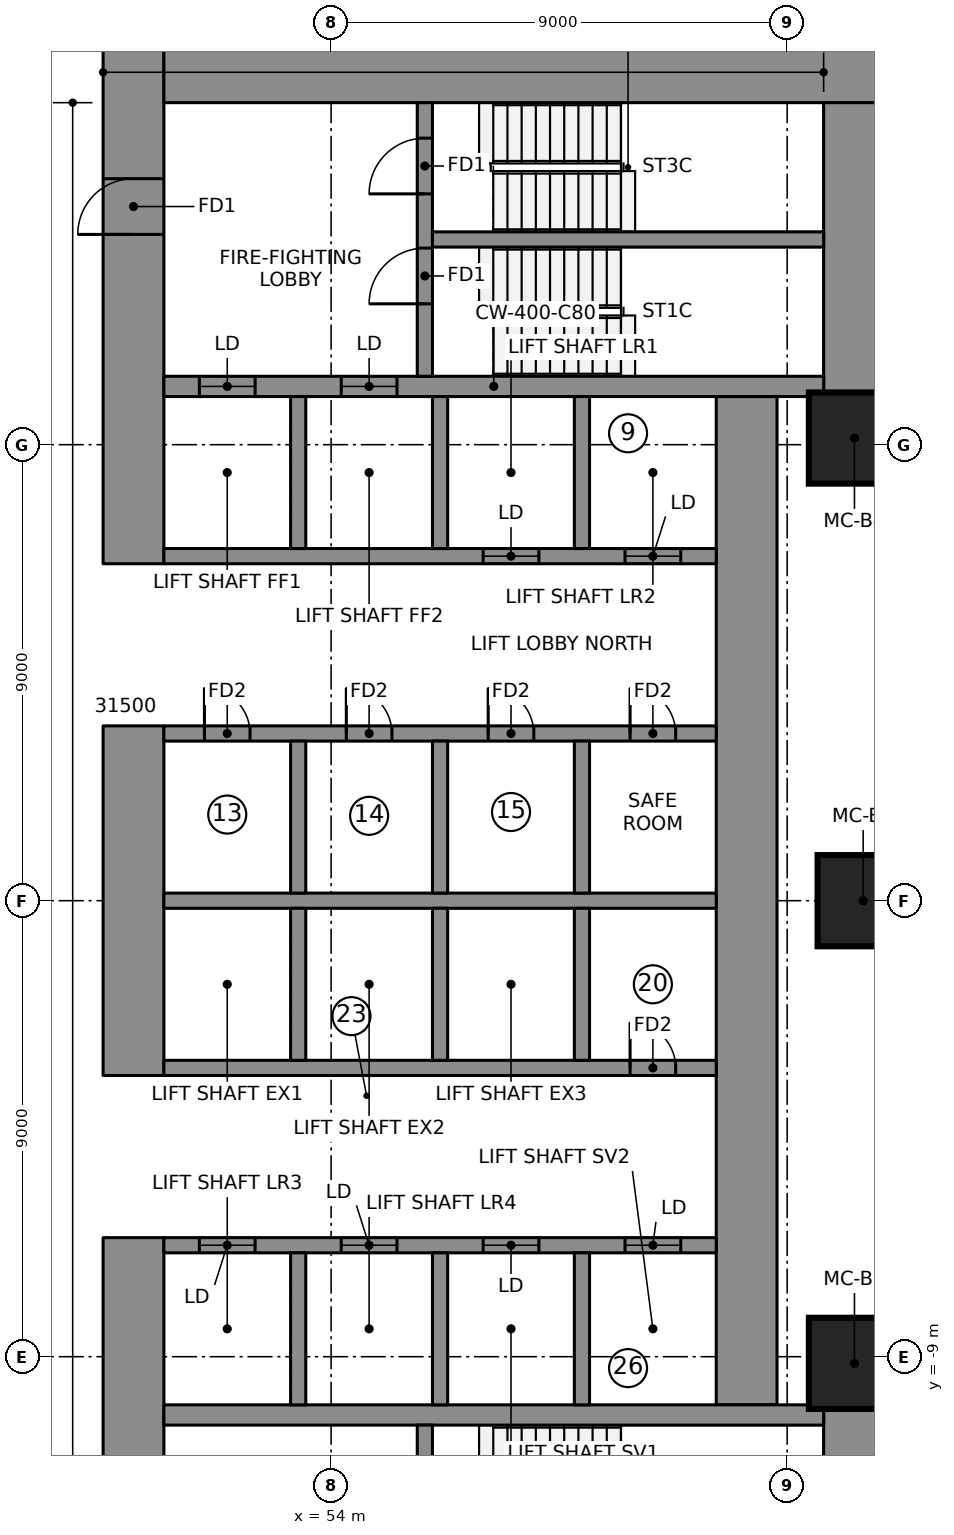
"""IFC4 building model, lengths in metres.
Left out: names, types, materials, properties, quantities, classifications, styles, units other than length and angle.
Written with IfcOpenShell. Run it as: python <this file> out.ifc"""

import sys

from ifc_helpers import new_model, si_unit, direction, frame, frame_2d, origin, origin_2d, place, context, subcontext, project, spatial, rectangle, extrude, element, fill, save


model = new_model("IFC4")
c1 = context("Model", 3, precision=1e-05, world=origin(), true_north=direction((0.0, 1.0)))
c2 = subcontext(c1, "Body", "Model", "MODEL_VIEW")
j1 = project(units=[si_unit("LENGTHUNIT", "METRE"), si_unit("PLANEANGLEUNIT", "RADIAN")], contexts=[c1])
p1 = place(None, origin())
s1 = spatial("IfcSite", under=j1, at=p1, CompositionType="ELEMENT")
p2 = place(p1, origin())
s2 = spatial("IfcBuilding", under=s1, at=p2, CompositionType="ELEMENT")
p3 = place(p2, frame((0.0, 0.0, 50.25)))
s3 = spatial("IfcBuildingStorey", under=s2, at=p3, CompositionType="ELEMENT", Elevation=50.25)
p4 = place(p3, frame((50.1, 6.65, 0.0), z_axis=(0.0, 0.0, 1.0), x_axis=(0.0, 1.0, 0.0)))
e1 = element("IfcWall", 1, at=p4, inside=s3, PredefinedType="SHEAR", context=c2, shape_type="SweptSolid", body=[
    extrude(rectangle(XDim=10.3, YDim=1.2, at=frame_2d((5.15, 0.0))), origin(), (0.0, 0.0, 1.0), 3.55),
])
p5 = place(p4, frame((6.5, 0.0, 0.0)))
e2 = element("IfcOpeningElement", 2, at=p5, cuts=e1, PredefinedType="OPENING", context=c2, shape_type="SweptSolid", body=[
    extrude(rectangle(XDim=1.1, YDim=2.1, at=frame_2d((0.55, 1.05))), frame((0.0, 0.61, 0.0), z_axis=(0.0, -1.0, 0.0), x_axis=(1.0, 0.0, 0.0)), (0.0, 0.0, 1.0), 1.22),
])
p6 = place(p3, frame((50.1, -3.45, 0.0), z_axis=(0.0, 0.0, 1.0), x_axis=(0.0, 1.0, 0.0)))
e3 = element("IfcWall", 3, at=p6, inside=s3, PredefinedType="SHEAR", context=c2, shape_type="SweptSolid", body=[
    extrude(rectangle(XDim=6.9, YDim=1.2, at=frame_2d((3.45, 0.0))), origin(), (0.0, 0.0, 1.0), 3.55),
])
p7 = place(p3, frame((50.1, -16.95, 0.0), z_axis=(0.0, 0.0, 1.0), x_axis=(0.0, 1.0, 0.0)))
e4 = element("IfcWall", 4, at=p7, inside=s3, PredefinedType="SHEAR", context=c2, shape_type="SweptSolid", body=[
    extrude(rectangle(XDim=10.3, YDim=1.2, at=frame_2d((5.15, 0.0))), origin(), (0.0, 0.0, 1.0), 3.55),
])
p8 = place(p7, frame((2.7, 0.0, 0.0)))
e5 = element("IfcOpeningElement", 5, at=p8, cuts=e4, PredefinedType="OPENING", context=c2, shape_type="SweptSolid", body=[
    extrude(rectangle(XDim=1.1, YDim=2.1, at=frame_2d((0.55, 1.05))), frame((0.0, 0.61, 0.0), z_axis=(0.0, -1.0, 0.0), x_axis=(1.0, 0.0, 0.0)), (0.0, 0.0, 1.0), 1.22),
])
p9 = place(p3, frame((50.7, 16.35, 0.0), z_axis=(0.0, 0.0, 1.0), x_axis=(1.0, 0.0, 0.0)))
e6 = element("IfcWall", 6, at=p9, inside=s3, PredefinedType="SHEAR", context=c2, shape_type="SweptSolid", body=[
    extrude(rectangle(XDim=14.22, YDim=1.2, at=frame_2d((7.11, 0.0))), origin(), (0.0, 0.0, 1.0), 3.55),
])
for number, where, z_axis, x_axis in (
    (7, (64.32, 9.95, 0.0), (0.0, 0.0, 1.0), (0.0, 1.0, 0.0)),
    (8, (64.32, -15.75, 0.0), (0.0, 0.0, 1.0), (0.0, 1.0, 0.0)),
):
    element("IfcWall", number, at=place(p3, frame(where, z_axis=z_axis, x_axis=x_axis)), inside=s3, PredefinedType="SHEAR", context=c2, shape_type="SweptSolid", body=[
        extrude(rectangle(XDim=5.8, YDim=1.2, at=frame_2d((2.9, 0.0))), origin(), (0.0, 0.0, 1.0), 3.55),
    ])
p10 = place(p3, frame((62.2, -9.95, 0.0), z_axis=(0.0, 0.0, 1.0), x_axis=(0.0, 1.0, 0.0)))
e9 = element("IfcWall", 9, at=p10, inside=s3, PredefinedType="SHEAR", context=c2, shape_type="SweptSolid", body=[
    extrude(rectangle(XDim=19.9, YDim=1.2, at=frame_2d((9.95, 0.0))), origin(), (0.0, 0.0, 1.0), 3.55),
])
p11 = place(p3, frame((50.7, 10.15, 0.0), z_axis=(0.0, 0.0, 1.0), x_axis=(1.0, 0.0, 0.0)))
e10 = element("IfcWall", 10, at=p11, inside=s3, PredefinedType="SHEAR", context=c2, shape_type="SweptSolid", body=[
    extrude(rectangle(XDim=13.02, YDim=0.4, at=frame_2d((6.51, 0.0))), origin(), (0.0, 0.0, 1.0), 3.55),
])
p12 = place(p11, frame((0.7, 0.0, 0.0)))
e11 = element("IfcOpeningElement", 11, at=p12, cuts=e10, PredefinedType="OPENING", context=c2, shape_type="SweptSolid", body=[
    extrude(rectangle(XDim=1.1, YDim=2.1, at=frame_2d((0.55, 1.05))), frame((0.0, 0.21, 0.0), z_axis=(0.0, -1.0, 0.0), x_axis=(1.0, 0.0, 0.0)), (0.0, 0.0, 1.0), 0.42),
])
p13 = place(p11, frame((3.5, 0.0, 0.0)))
e12 = element("IfcOpeningElement", 12, at=p13, cuts=e10, PredefinedType="OPENING", context=c2, shape_type="SweptSolid", body=[
    extrude(rectangle(XDim=1.1, YDim=2.1, at=frame_2d((0.55, 1.05))), frame((0.0, 0.21, 0.0), z_axis=(0.0, -1.0, 0.0), x_axis=(1.0, 0.0, 0.0)), (0.0, 0.0, 1.0), 0.42),
])
p14 = place(p3, frame((50.7, -10.15, 0.0), z_axis=(0.0, 0.0, 1.0), x_axis=(1.0, 0.0, 0.0)))
e13 = element("IfcWall", 13, at=p14, inside=s3, PredefinedType="SHEAR", context=c2, shape_type="SweptSolid", body=[
    extrude(rectangle(XDim=13.02, YDim=0.4, at=frame_2d((6.51, 0.0))), origin(), (0.0, 0.0, 1.0), 3.55),
])
p15 = place(p3, frame((50.7, 0.0, 0.0), z_axis=(0.0, 0.0, 1.0), x_axis=(1.0, 0.0, 0.0)))
e14 = element("IfcWall", 14, at=p15, inside=s3, PredefinedType="SHEAR", context=c2, shape_type="SweptSolid", body=[
    extrude(rectangle(XDim=10.9, YDim=0.3, at=frame_2d((5.45, 0.0))), origin(), (0.0, 0.0, 1.0), 3.55),
])
p16 = place(p3, frame((50.7, 3.3, 0.0), z_axis=(0.0, 0.0, 1.0), x_axis=(1.0, 0.0, 0.0)))
e15 = element("IfcWall", 15, at=p16, inside=s3, PredefinedType="SHEAR", context=c2, shape_type="SweptSolid", body=[
    extrude(rectangle(XDim=10.9, YDim=0.3, at=frame_2d((5.45, 0.0))), origin(), (0.0, 0.0, 1.0), 3.55),
])
p17 = place(p16, frame((0.8, 0.0, 0.0)))
e16 = element("IfcOpeningElement", 16, at=p17, cuts=e15, PredefinedType="OPENING", context=c2, shape_type="SweptSolid", body=[
    extrude(rectangle(XDim=0.9, YDim=2.1, at=frame_2d((0.45, 1.05))), frame((0.0, 0.16, 0.0), z_axis=(0.0, -1.0, 0.0), x_axis=(1.0, 0.0, 0.0)), (0.0, 0.0, 1.0), 0.32),
])
p18 = place(p16, frame((3.6, 0.0, 0.0)))
e17 = element("IfcOpeningElement", 17, at=p18, cuts=e15, PredefinedType="OPENING", context=c2, shape_type="SweptSolid", body=[
    extrude(rectangle(XDim=0.9, YDim=2.1, at=frame_2d((0.45, 1.05))), frame((0.0, 0.16, 0.0), z_axis=(0.0, -1.0, 0.0), x_axis=(1.0, 0.0, 0.0)), (0.0, 0.0, 1.0), 0.32),
])
p19 = place(p16, frame((6.4, 0.0, 0.0)))
e18 = element("IfcOpeningElement", 18, at=p19, cuts=e15, PredefinedType="OPENING", context=c2, shape_type="SweptSolid", body=[
    extrude(rectangle(XDim=0.9, YDim=2.1, at=frame_2d((0.45, 1.05))), frame((0.0, 0.16, 0.0), z_axis=(0.0, -1.0, 0.0), x_axis=(1.0, 0.0, 0.0)), (0.0, 0.0, 1.0), 0.32),
])
p20 = place(p16, frame((9.2, 0.0, 0.0)))
e19 = element("IfcOpeningElement", 19, at=p20, cuts=e15, PredefinedType="OPENING", context=c2, shape_type="SweptSolid", body=[
    extrude(rectangle(XDim=0.9, YDim=2.1, at=frame_2d((0.45, 1.05))), frame((0.0, 0.16, 0.0), z_axis=(0.0, -1.0, 0.0), x_axis=(1.0, 0.0, 0.0)), (0.0, 0.0, 1.0), 0.32),
])
p21 = place(p3, frame((50.7, 6.8, 0.0), z_axis=(0.0, 0.0, 1.0), x_axis=(1.0, 0.0, 0.0)))
e20 = element("IfcWall", 20, at=p21, inside=s3, PredefinedType="SHEAR", context=c2, shape_type="SweptSolid", body=[
    extrude(rectangle(XDim=10.9, YDim=0.3, at=frame_2d((5.45, 0.0))), origin(), (0.0, 0.0, 1.0), 3.55),
])
p22 = place(p21, frame((6.3, 0.0, 0.0)))
e21 = element("IfcOpeningElement", 21, at=p22, cuts=e20, PredefinedType="OPENING", context=c2, shape_type="SweptSolid", body=[
    extrude(rectangle(XDim=1.1, YDim=2.1, at=frame_2d((0.55, 1.05))), frame((0.0, 0.16, 0.0), z_axis=(0.0, -1.0, 0.0), x_axis=(1.0, 0.0, 0.0)), (0.0, 0.0, 1.0), 0.32),
])
p23 = place(p21, frame((9.1, 0.0, 0.0)))
e22 = element("IfcOpeningElement", 22, at=p23, cuts=e20, PredefinedType="OPENING", context=c2, shape_type="SweptSolid", body=[
    extrude(rectangle(XDim=1.1, YDim=2.1, at=frame_2d((0.55, 1.05))), frame((0.0, 0.16, 0.0), z_axis=(0.0, -1.0, 0.0), x_axis=(1.0, 0.0, 0.0)), (0.0, 0.0, 1.0), 0.32),
])
for number, where, z_axis, x_axis in (
    (23, (53.35, 0.15, 0.0), (0.0, 0.0, 1.0), (0.0, 1.0, 0.0)),
    (24, (53.35, 6.95, 0.0), (0.0, 0.0, 1.0), (0.0, 1.0, 0.0)),
    (25, (56.15, 0.15, 0.0), (0.0, 0.0, 1.0), (0.0, 1.0, 0.0)),
    (26, (56.15, 6.95, 0.0), (0.0, 0.0, 1.0), (0.0, 1.0, 0.0)),
    (27, (58.95, 0.15, 0.0), (0.0, 0.0, 1.0), (0.0, 1.0, 0.0)),
    (28, (58.95, 6.95, 0.0), (0.0, 0.0, 1.0), (0.0, 1.0, 0.0)),
):
    element("IfcWall", number, at=place(p3, frame(where, z_axis=z_axis, x_axis=x_axis)), inside=s3, PredefinedType="SHEAR", context=c2, shape_type="SweptSolid", body=[
        extrude(rectangle(XDim=3.0, YDim=0.3, at=frame_2d((1.5, 0.0))), origin(), (0.0, 0.0, 1.0), 3.55),
    ])
p24 = place(p3, frame((50.7, -3.3, 0.0), z_axis=(0.0, 0.0, 1.0), x_axis=(1.0, 0.0, 0.0)))
e29 = element("IfcWall", 29, at=p24, inside=s3, PredefinedType="SHEAR", context=c2, shape_type="SweptSolid", body=[
    extrude(rectangle(XDim=10.9, YDim=0.3, at=frame_2d((5.45, 0.0))), origin(), (0.0, 0.0, 1.0), 3.55),
])
p25 = place(p24, frame((9.2, 0.0, 0.0)))
e30 = element("IfcOpeningElement", 30, at=p25, cuts=e29, PredefinedType="OPENING", context=c2, shape_type="SweptSolid", body=[
    extrude(rectangle(XDim=0.9, YDim=2.1, at=frame_2d((0.45, 1.05))), frame((0.0, 0.16, 0.0), z_axis=(0.0, -1.0, 0.0), x_axis=(1.0, 0.0, 0.0)), (0.0, 0.0, 1.0), 0.32),
])
p26 = place(p3, frame((50.7, -6.8, 0.0), z_axis=(0.0, 0.0, 1.0), x_axis=(1.0, 0.0, 0.0)))
e31 = element("IfcWall", 31, at=p26, inside=s3, PredefinedType="SHEAR", context=c2, shape_type="SweptSolid", body=[
    extrude(rectangle(XDim=10.9, YDim=0.3, at=frame_2d((5.45, 0.0))), origin(), (0.0, 0.0, 1.0), 3.55),
])
p27 = place(p26, frame((0.7, 0.0, 0.0)))
e32 = element("IfcOpeningElement", 32, at=p27, cuts=e31, PredefinedType="OPENING", context=c2, shape_type="SweptSolid", body=[
    extrude(rectangle(XDim=1.1, YDim=2.1, at=frame_2d((0.55, 1.05))), frame((0.0, 0.16, 0.0), z_axis=(0.0, -1.0, 0.0), x_axis=(1.0, 0.0, 0.0)), (0.0, 0.0, 1.0), 0.32),
])
p28 = place(p26, frame((3.5, 0.0, 0.0)))
e33 = element("IfcOpeningElement", 33, at=p28, cuts=e31, PredefinedType="OPENING", context=c2, shape_type="SweptSolid", body=[
    extrude(rectangle(XDim=1.1, YDim=2.1, at=frame_2d((0.55, 1.05))), frame((0.0, 0.16, 0.0), z_axis=(0.0, -1.0, 0.0), x_axis=(1.0, 0.0, 0.0)), (0.0, 0.0, 1.0), 0.32),
])
p29 = place(p26, frame((6.3, 0.0, 0.0)))
e34 = element("IfcOpeningElement", 34, at=p29, cuts=e31, PredefinedType="OPENING", context=c2, shape_type="SweptSolid", body=[
    extrude(rectangle(XDim=1.1, YDim=2.1, at=frame_2d((0.55, 1.05))), frame((0.0, 0.16, 0.0), z_axis=(0.0, -1.0, 0.0), x_axis=(1.0, 0.0, 0.0)), (0.0, 0.0, 1.0), 0.32),
])
p30 = place(p26, frame((9.1, 0.0, 0.0)))
e35 = element("IfcOpeningElement", 35, at=p30, cuts=e31, PredefinedType="OPENING", context=c2, shape_type="SweptSolid", body=[
    extrude(rectangle(XDim=1.1, YDim=2.1, at=frame_2d((0.55, 1.05))), frame((0.0, 0.16, 0.0), z_axis=(0.0, -1.0, 0.0), x_axis=(1.0, 0.0, 0.0)), (0.0, 0.0, 1.0), 0.32),
])
for number, where, z_axis, x_axis in (
    (36, (53.35, -3.15, 0.0), (0.0, 0.0, 1.0), (0.0, 1.0, 0.0)),
    (37, (53.35, -9.95, 0.0), (0.0, 0.0, 1.0), (0.0, 1.0, 0.0)),
    (38, (56.15, -3.15, 0.0), (0.0, 0.0, 1.0), (0.0, 1.0, 0.0)),
    (39, (56.15, -9.95, 0.0), (0.0, 0.0, 1.0), (0.0, 1.0, 0.0)),
    (40, (58.95, -3.15, 0.0), (0.0, 0.0, 1.0), (0.0, 1.0, 0.0)),
    (41, (58.95, -9.95, 0.0), (0.0, 0.0, 1.0), (0.0, 1.0, 0.0)),
):
    element("IfcWall", number, at=place(p3, frame(where, z_axis=z_axis, x_axis=x_axis)), inside=s3, PredefinedType="SHEAR", context=c2, shape_type="SweptSolid", body=[
        extrude(rectangle(XDim=3.0, YDim=0.3, at=frame_2d((1.5, 0.0))), origin(), (0.0, 0.0, 1.0), 3.55),
    ])
p31 = place(p3, frame((55.85, 10.35, 0.0), z_axis=(0.0, 0.0, 1.0), x_axis=(0.0, 1.0, 0.0)))
e42 = element("IfcWall", 42, at=p31, inside=s3, PredefinedType="SHEAR", context=c2, shape_type="SweptSolid", body=[
    extrude(rectangle(XDim=5.4, YDim=0.3, at=frame_2d((2.7, 0.0))), origin(), (0.0, 0.0, 1.0), 3.55),
])
p32 = place(p31, frame((1.43, 0.0, 0.0)))
e43 = element("IfcOpeningElement", 43, at=p32, cuts=e42, PredefinedType="OPENING", context=c2, shape_type="SweptSolid", body=[
    extrude(rectangle(XDim=1.1, YDim=2.1, at=frame_2d((0.55, 1.05))), frame((0.0, 0.16, 0.0), z_axis=(0.0, -1.0, 0.0), x_axis=(1.0, 0.0, 0.0)), (0.0, 0.0, 1.0), 0.32),
])
p33 = place(p31, frame((3.6, 0.0, 0.0)))
e44 = element("IfcOpeningElement", 44, at=p33, cuts=e42, PredefinedType="OPENING", context=c2, shape_type="SweptSolid", body=[
    extrude(rectangle(XDim=1.1, YDim=2.1, at=frame_2d((0.55, 1.05))), frame((0.0, 0.16, 0.0), z_axis=(0.0, -1.0, 0.0), x_axis=(1.0, 0.0, 0.0)), (0.0, 0.0, 1.0), 0.32),
])
p34 = place(p3, frame((55.85, -15.75, 0.0), z_axis=(0.0, 0.0, 1.0), x_axis=(0.0, 1.0, 0.0)))
e45 = element("IfcWall", 45, at=p34, inside=s3, PredefinedType="SHEAR", context=c2, shape_type="SweptSolid", body=[
    extrude(rectangle(XDim=5.4, YDim=0.3, at=frame_2d((2.7, 0.0))), origin(), (0.0, 0.0, 1.0), 3.55),
])
p35 = place(p34, frame((3.6, 0.0, 0.0)))
e46 = element("IfcOpeningElement", 46, at=p35, cuts=e45, PredefinedType="OPENING", context=c2, shape_type="SweptSolid", body=[
    extrude(rectangle(XDim=1.1, YDim=2.1, at=frame_2d((0.55, 1.05))), frame((0.0, 0.16, 0.0), z_axis=(0.0, -1.0, 0.0), x_axis=(1.0, 0.0, 0.0)), (0.0, 0.0, 1.0), 0.32),
])
p36 = place(p34, frame((0.8, 0.0, 0.0)))
e47 = element("IfcOpeningElement", 47, at=p36, cuts=e45, PredefinedType="OPENING", context=c2, shape_type="SweptSolid", body=[
    extrude(rectangle(XDim=0.9, YDim=2.1, at=frame_2d((0.45, 1.05))), frame((0.0, 0.16, 0.0), z_axis=(0.0, -1.0, 0.0), x_axis=(1.0, 0.0, 0.0)), (0.0, 0.0, 1.0), 0.32),
])
p37 = place(p3, frame((56.0, 13.05, 0.0), z_axis=(0.0, 0.0, 1.0), x_axis=(1.0, 0.0, 0.0)))
e48 = element("IfcWall", 48, at=p37, inside=s3, PredefinedType="SHEAR", context=c2, shape_type="SweptSolid", body=[
    extrude(rectangle(XDim=7.72, YDim=0.3, at=frame_2d((3.86, 0.0))), origin(), (0.0, 0.0, 1.0), 3.55),
])
for number, where, z_axis, x_axis in (
    (49, (64.328, -9.131, 0.0), (0.0, 0.0, 1.0), (1.0, 0.0, 0.0)),
    (50, (64.5, 0.0, 0.0), (0.0, 0.0, 1.0), (1.0, 0.0, 0.0)),
    (51, (64.328, 9.131, 0.0), (0.0, 0.0, 1.0), (1.0, 0.0, 0.0)),
):
    element("IfcColumn", number, at=place(p3, frame(where, z_axis=z_axis, x_axis=x_axis)), inside=s3, PredefinedType="COLUMN", context=c2, shape_type="SweptSolid", body=[
        extrude(rectangle(XDim=1.8, YDim=1.8, at=origin_2d()), origin(), (0.0, 0.0, 1.0), 3.55),
    ])
p38 = place(p12, origin())
e52 = element("IfcDoor", 52, at=p38, inside=s3, OperationType="DOUBLE_DOOR_SLIDING", PredefinedType="DOOR", context=c2, shape_type="SweptSolid", body=[
    extrude(rectangle(XDim=1.1, YDim=2.1, at=frame_2d((0.55, 1.05))), frame((0.0, 0.025, 0.0), z_axis=(0.0, -1.0, 0.0), x_axis=(1.0, 0.0, 0.0)), (0.0, 0.0, 1.0), 0.05),
])
fill(e11, e52)
p39 = place(p13, origin())
e53 = element("IfcDoor", 53, at=p39, inside=s3, OperationType="DOUBLE_DOOR_SLIDING", PredefinedType="DOOR", context=c2, shape_type="SweptSolid", body=[
    extrude(rectangle(XDim=1.1, YDim=2.1, at=frame_2d((0.55, 1.05))), frame((0.0, 0.025, 0.0), z_axis=(0.0, -1.0, 0.0), x_axis=(1.0, 0.0, 0.0)), (0.0, 0.0, 1.0), 0.05),
])
fill(e12, e53)
p40 = place(p22, origin())
e54 = element("IfcDoor", 54, at=p40, inside=s3, OperationType="DOUBLE_DOOR_SLIDING", PredefinedType="DOOR", context=c2, shape_type="SweptSolid", body=[
    extrude(rectangle(XDim=1.1, YDim=2.1, at=frame_2d((0.55, 1.05))), frame((0.0, 0.025, 0.0), z_axis=(0.0, -1.0, 0.0), x_axis=(1.0, 0.0, 0.0)), (0.0, 0.0, 1.0), 0.05),
])
fill(e21, e54)
p41 = place(p23, origin())
e55 = element("IfcDoor", 55, at=p41, inside=s3, OperationType="DOUBLE_DOOR_SLIDING", PredefinedType="DOOR", context=c2, shape_type="SweptSolid", body=[
    extrude(rectangle(XDim=1.1, YDim=2.1, at=frame_2d((0.55, 1.05))), frame((0.0, 0.025, 0.0), z_axis=(0.0, -1.0, 0.0), x_axis=(1.0, 0.0, 0.0)), (0.0, 0.0, 1.0), 0.05),
])
fill(e22, e55)
p42 = place(p27, origin())
e56 = element("IfcDoor", 56, at=p42, inside=s3, OperationType="DOUBLE_DOOR_SLIDING", PredefinedType="DOOR", context=c2, shape_type="SweptSolid", body=[
    extrude(rectangle(XDim=1.1, YDim=2.1, at=frame_2d((0.55, 1.05))), frame((0.0, 0.025, 0.0), z_axis=(0.0, -1.0, 0.0), x_axis=(1.0, 0.0, 0.0)), (0.0, 0.0, 1.0), 0.05),
])
fill(e32, e56)
p43 = place(p28, origin())
e57 = element("IfcDoor", 57, at=p43, inside=s3, OperationType="DOUBLE_DOOR_SLIDING", PredefinedType="DOOR", context=c2, shape_type="SweptSolid", body=[
    extrude(rectangle(XDim=1.1, YDim=2.1, at=frame_2d((0.55, 1.05))), frame((0.0, 0.025, 0.0), z_axis=(0.0, -1.0, 0.0), x_axis=(1.0, 0.0, 0.0)), (0.0, 0.0, 1.0), 0.05),
])
fill(e33, e57)
p44 = place(p29, origin())
e58 = element("IfcDoor", 58, at=p44, inside=s3, OperationType="DOUBLE_DOOR_SLIDING", PredefinedType="DOOR", context=c2, shape_type="SweptSolid", body=[
    extrude(rectangle(XDim=1.1, YDim=2.1, at=frame_2d((0.55, 1.05))), frame((0.0, 0.025, 0.0), z_axis=(0.0, -1.0, 0.0), x_axis=(1.0, 0.0, 0.0)), (0.0, 0.0, 1.0), 0.05),
])
fill(e34, e58)
p45 = place(p30, origin())
e59 = element("IfcDoor", 59, at=p45, inside=s3, OperationType="DOUBLE_DOOR_SLIDING", PredefinedType="DOOR", context=c2, shape_type="SweptSolid", body=[
    extrude(rectangle(XDim=1.1, YDim=2.1, at=frame_2d((0.55, 1.05))), frame((0.0, 0.025, 0.0), z_axis=(0.0, -1.0, 0.0), x_axis=(1.0, 0.0, 0.0)), (0.0, 0.0, 1.0), 0.05),
])
fill(e35, e59)
p46 = place(p32, origin())
e60 = element("IfcDoor", 60, at=p46, inside=s3, OperationType="SINGLE_SWING_RIGHT", PredefinedType="DOOR", context=c2, shape_type="SweptSolid", body=[
    extrude(rectangle(XDim=1.1, YDim=2.1, at=frame_2d((0.55, 1.05))), frame((0.0, 0.025, 0.0), z_axis=(0.0, -1.0, 0.0), x_axis=(1.0, 0.0, 0.0)), (0.0, 0.0, 1.0), 0.05),
])
fill(e43, e60)
p47 = place(p33, origin())
e61 = element("IfcDoor", 61, at=p47, inside=s3, OperationType="SINGLE_SWING_RIGHT", PredefinedType="DOOR", context=c2, shape_type="SweptSolid", body=[
    extrude(rectangle(XDim=1.1, YDim=2.1, at=frame_2d((0.55, 1.05))), frame((0.0, 0.025, 0.0), z_axis=(0.0, -1.0, 0.0), x_axis=(1.0, 0.0, 0.0)), (0.0, 0.0, 1.0), 0.05),
])
fill(e44, e61)
p48 = place(p5, origin())
e62 = element("IfcDoor", 62, at=p48, inside=s3, OperationType="SINGLE_SWING_RIGHT", PredefinedType="DOOR", context=c2, shape_type="SweptSolid", body=[
    extrude(rectangle(XDim=1.1, YDim=2.1, at=frame_2d((0.55, 1.05))), frame((0.0, 0.025, 0.0), z_axis=(0.0, -1.0, 0.0), x_axis=(1.0, 0.0, 0.0)), (0.0, 0.0, 1.0), 0.05),
])
fill(e2, e62)
p49 = place(p17, origin())
e63 = element("IfcDoor", 63, at=p49, inside=s3, OperationType="SINGLE_SWING_LEFT", PredefinedType="DOOR", context=c2, shape_type="SweptSolid", body=[
    extrude(rectangle(XDim=0.9, YDim=2.1, at=frame_2d((0.45, 1.05))), frame((0.0, 0.025, 0.0), z_axis=(0.0, -1.0, 0.0), x_axis=(1.0, 0.0, 0.0)), (0.0, 0.0, 1.0), 0.05),
])
fill(e16, e63)
p50 = place(p18, origin())
e64 = element("IfcDoor", 64, at=p50, inside=s3, OperationType="SINGLE_SWING_LEFT", PredefinedType="DOOR", context=c2, shape_type="SweptSolid", body=[
    extrude(rectangle(XDim=0.9, YDim=2.1, at=frame_2d((0.45, 1.05))), frame((0.0, 0.025, 0.0), z_axis=(0.0, -1.0, 0.0), x_axis=(1.0, 0.0, 0.0)), (0.0, 0.0, 1.0), 0.05),
])
fill(e17, e64)
p51 = place(p19, origin())
e65 = element("IfcDoor", 65, at=p51, inside=s3, OperationType="SINGLE_SWING_LEFT", PredefinedType="DOOR", context=c2, shape_type="SweptSolid", body=[
    extrude(rectangle(XDim=0.9, YDim=2.1, at=frame_2d((0.45, 1.05))), frame((0.0, 0.025, 0.0), z_axis=(0.0, -1.0, 0.0), x_axis=(1.0, 0.0, 0.0)), (0.0, 0.0, 1.0), 0.05),
])
fill(e18, e65)
p52 = place(p20, origin())
e66 = element("IfcDoor", 66, at=p52, inside=s3, OperationType="SINGLE_SWING_LEFT", PredefinedType="DOOR", context=c2, shape_type="SweptSolid", body=[
    extrude(rectangle(XDim=0.9, YDim=2.1, at=frame_2d((0.45, 1.05))), frame((0.0, 0.025, 0.0), z_axis=(0.0, -1.0, 0.0), x_axis=(1.0, 0.0, 0.0)), (0.0, 0.0, 1.0), 0.05),
])
fill(e19, e66)
p53 = place(p25, origin())
e67 = element("IfcDoor", 67, at=p53, inside=s3, OperationType="SINGLE_SWING_LEFT", PredefinedType="DOOR", context=c2, shape_type="SweptSolid", body=[
    extrude(rectangle(XDim=0.9, YDim=2.1, at=frame_2d((0.45, 1.05))), frame((0.0, 0.025, 0.0), z_axis=(0.0, -1.0, 0.0), x_axis=(1.0, 0.0, 0.0)), (0.0, 0.0, 1.0), 0.05),
])
fill(e30, e67)
save(model, sys.argv[1])
